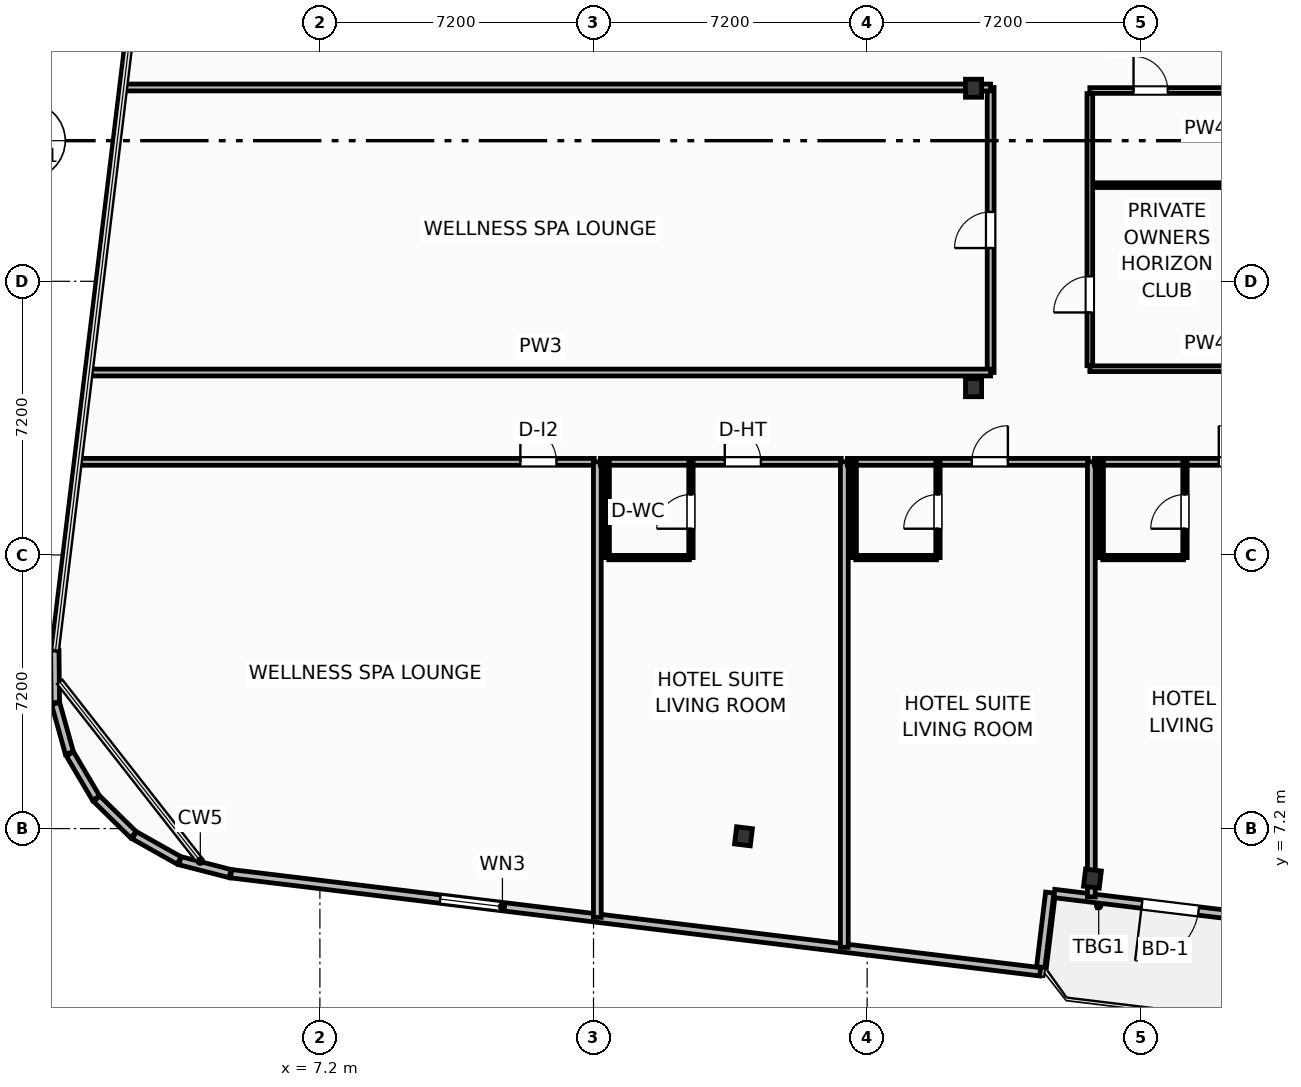
"""IFC4 building model, lengths in metres.
Left out: names, types, materials, properties, quantities, classifications, styles, units other than length and angle.
Written with IfcOpenShell. Run it as: python <this file> out.ifc"""

import sys

from ifc_helpers import new_model, si_unit, direction, frame, frame_2d, origin, origin_2d, place, context, subcontext, project, spatial, rectangle, i_section, extrude, element, fill, save


model = new_model("IFC4")
c1 = context("Model", 3, precision=1e-05, world=origin(), true_north=direction((0.0, 1.0)))
c2 = subcontext(c1, "Body", "Model", "MODEL_VIEW")
j1 = project(units=[si_unit("LENGTHUNIT", "METRE"), si_unit("PLANEANGLEUNIT", "RADIAN")], contexts=[c1])
p1 = place(None, origin())
s1 = spatial("IfcSite", under=j1, at=p1, CompositionType="ELEMENT")
p2 = place(p1, origin())
s2 = spatial("IfcBuilding", under=s1, at=p2, CompositionType="ELEMENT")
p3 = place(p2, frame((0.0, 0.0, 121.7)))
s3 = spatial("IfcBuildingStorey", under=s2, at=p3, CompositionType="ELEMENT", Elevation=121.7)
for number, where, z_axis, x_axis in (
    (1, (24.4, 18.8, 0.0), (0.0, 0.0, 1.0), (1.0, 0.0, 0.0)),
    (2, (24.4, 26.68, 0.0), (0.0, 0.0, 1.0), (1.0, 0.0, 0.0)),
):
    element("IfcColumn", number, at=place(p3, frame(where, z_axis=z_axis, x_axis=x_axis)), inside=s3, PredefinedType="COLUMN", context=c2, shape_type="SweptSolid", body=[
        extrude(i_section(OverallWidth=0.424, OverallDepth=0.474, WebThickness=0.048, FlangeThickness=0.077, FilletRadius=0.025, at=origin_2d()), origin(), (0.0, 0.0, 1.0), 3.7),
    ])
for number, where, z_axis, x_axis in (
    (3, (18.346, 6.997, 0.0), (0.0, 0.0, 1.0), (0.993, -0.12, 0.0)),
    (4, (27.529, 5.884, 0.0), (0.0, 0.0, 1.0), (0.993, -0.12, 0.0)),
):
    element("IfcColumn", number, at=place(p3, frame(where, z_axis=z_axis, x_axis=x_axis)), inside=s3, PredefinedType="COLUMN", context=c2, shape_type="SweptSolid", body=[
        extrude(i_section(OverallWidth=0.418, OverallDepth=0.455, WebThickness=0.042, FlangeThickness=0.068, FilletRadius=0.025, at=origin_2d()), origin(), (0.0, 0.0, 1.0), 3.7),
    ])
p4 = place(p3, frame((32.48, 4.77, 0.0), z_axis=(0.0, 0.0, 1.0), x_axis=(-0.992735402148, 0.120318000826, 0.0)))
e5 = element("IfcWall", 5, at=p4, inside=s3, PredefinedType="SOLIDWALL", context=c2, shape_type="SweptSolid", body=[
    extrude(rectangle(XDim=6.0, YDim=0.22, at=frame_2d((3.0, 0.0))), origin(), (0.0, 0.0, 1.0), 2.73),
])
p5 = place(p4, frame((2.176, 0.0, 0.0)))
e6 = element("IfcOpeningElement", 6, at=p5, cuts=e5, PredefinedType="OPENING", context=c2, shape_type="SweptSolid", body=[
    extrude(rectangle(XDim=1.5, YDim=2.25, at=frame_2d((0.75, 1.125))), frame((0.0, 0.12, 0.0), z_axis=(0.0, -1.0, 0.0), x_axis=(1.0, 0.0, 0.0)), (0.0, 0.0, 1.0), 0.24),
])
p6 = place(p3, frame((0.224, 11.893, 0.0), z_axis=(0.0, 0.0, 1.0), x_axis=(0.010098705419, -0.999949006774, 0.0)))
e7 = element("IfcWall", 7, at=p6, inside=s3, PredefinedType="SOLIDWALL", context=c2, shape_type="SweptSolid", body=[
    extrude(rectangle(XDim=1.378, YDim=0.22, at=frame_2d((0.689, 0.0))), origin(), (0.0, 0.0, 1.0), 2.73),
])
p7 = place(p3, frame((0.245, 10.491, 0.0), z_axis=(0.0, 0.0, 1.0), x_axis=(0.268853470153, -0.963181089716, 0.0)))
e8 = element("IfcWall", 8, at=p7, inside=s3, PredefinedType="SOLIDWALL", context=c2, shape_type="SweptSolid", body=[
    extrude(rectangle(XDim=1.353, YDim=0.22, at=frame_2d((0.677, 0.0))), origin(), (0.0, 0.0, 1.0), 2.73),
])
p8 = place(p3, frame((0.622, 9.166, 0.0), z_axis=(0.0, 0.0, 1.0), x_axis=(0.508911700393, -0.860818727261, 0.0)))
e9 = element("IfcWall", 9, at=p8, inside=s3, PredefinedType="SOLIDWALL", context=c2, shape_type="SweptSolid", body=[
    extrude(rectangle(XDim=1.353, YDim=0.22, at=frame_2d((0.676, 0.0))), origin(), (0.0, 0.0, 1.0), 2.73),
])
p9 = place(p3, frame((1.328, 7.984, 0.0), z_axis=(0.0, 0.0, 1.0), x_axis=(0.714376989847, -0.69976104234, 0.0)))
e10 = element("IfcWall", 10, at=p9, inside=s3, PredefinedType="SOLIDWALL", context=c2, shape_type="SweptSolid", body=[
    extrude(rectangle(XDim=1.353, YDim=0.22, at=frame_2d((0.677, 0.0))), origin(), (0.0, 0.0, 1.0), 2.73),
])
p10 = place(p3, frame((2.316, 7.025, 0.0), z_axis=(0.0, 0.0, 1.0), x_axis=(0.87113677592, -0.491040443996, 0.0)))
e11 = element("IfcWall", 11, at=p10, inside=s3, PredefinedType="SOLIDWALL", context=c2, shape_type="SweptSolid", body=[
    extrude(rectangle(XDim=1.353, YDim=0.22, at=frame_2d((0.677, 0.0))), origin(), (0.0, 0.0, 1.0), 2.73),
])
p11 = place(p3, frame((3.519, 6.354, 0.0), z_axis=(0.0, 0.0, 1.0), x_axis=(0.968506529347, -0.248988157573, 0.0)))
e12 = element("IfcWall", 12, at=p11, inside=s3, PredefinedType="SOLIDWALL", context=c2, shape_type="SweptSolid", body=[
    extrude(rectangle(XDim=1.361, YDim=0.22, at=frame_2d((0.681, 0.0))), origin(), (0.0, 0.0, 1.0), 2.73),
])
p12 = place(p3, frame((4.862, 6.012, 0.0), z_axis=(0.0, 0.0, 1.0), x_axis=(0.99273213367, -0.120344965739, 0.0)))
e13 = element("IfcWall", 13, at=p12, inside=s3, PredefinedType="SOLIDWALL", context=c2, shape_type="SweptSolid", body=[
    extrude(rectangle(XDim=21.447, YDim=0.22, at=frame_2d((10.724, 0.0))), origin(), (0.0, 0.0, 1.0), 2.73),
])
p13 = place(p12, frame((5.543, 0.0, 0.8)))
e14 = element("IfcOpeningElement", 14, at=p13, cuts=e13, PredefinedType="OPENING", context=c2, shape_type="SweptSolid", body=[
    extrude(rectangle(XDim=1.65, YDim=1.65, at=frame_2d((0.825, 0.825))), frame((0.0, 0.12, 0.0), z_axis=(0.0, -1.0, 0.0), x_axis=(1.0, 0.0, 0.0)), (0.0, 0.0, 1.0), 0.24),
])
p14 = place(p3, frame((26.168, 3.555, 0.0), z_axis=(0.0, 0.0, 1.0), x_axis=(0.120290754542, 0.992738703976, 0.0)))
e15 = element("IfcWall", 15, at=p14, inside=s3, PredefinedType="SOLIDWALL", context=c2, shape_type="SweptSolid", body=[
    extrude(rectangle(XDim=1.975, YDim=0.22, at=frame_2d((0.987, 0.0))), origin(), (0.0, 0.0, 1.0), 2.73),
])
p15 = place(p3, frame((0.884, 16.85, 0.0), z_axis=(0.0, 0.0, 1.0), x_axis=(1.0, 0.0, 0.0)))
e16 = element("IfcWall", 16, at=p15, inside=s3, PredefinedType="PARTITIONING", context=c2, shape_type="SweptSolid", body=[
    extrude(rectangle(XDim=13.536, YDim=0.18, at=frame_2d((6.768, 0.0))), origin(), (0.0, 0.0, 1.0), 3.45),
])
p16 = place(p15, frame((11.591, 0.0, 0.0)))
e17 = element("IfcOpeningElement", 17, at=p16, cuts=e16, PredefinedType="OPENING", context=c2, shape_type="SweptSolid", body=[
    extrude(rectangle(XDim=0.95, YDim=2.05, at=frame_2d((0.475, 1.025))), frame((0.0, 0.1, 0.0), z_axis=(0.0, -1.0, 0.0), x_axis=(1.0, 0.0, 0.0)), (0.0, 0.0, 1.0), 0.2),
])
p17 = place(p3, frame((14.5, 4.864, 0.0), z_axis=(0.0, 0.0, 1.0), x_axis=(0.0, 1.0, 0.0)))
e18 = element("IfcWall", 18, at=p17, inside=s3, PredefinedType="PARTITIONING", context=c2, shape_type="SweptSolid", body=[
    extrude(rectangle(XDim=11.986, YDim=0.205, at=frame_2d((5.993, 0.0))), origin(), (0.0, 0.0, 1.0), 3.45),
])
p18 = place(p3, frame((14.58, 16.85, 0.0), z_axis=(0.0, 0.0, 1.0), x_axis=(1.0, 0.0, 0.0)))
e19 = element("IfcWall", 19, at=p18, inside=s3, PredefinedType="PARTITIONING", context=c2, shape_type="SweptSolid", body=[
    extrude(rectangle(XDim=6.34, YDim=0.18, at=frame_2d((3.17, 0.0))), origin(), (0.0, 0.0, 1.0), 3.45),
])
p19 = place(p18, frame((3.274, 0.0, 0.0)))
e20 = element("IfcOpeningElement", 20, at=p19, cuts=e19, PredefinedType="OPENING", context=c2, shape_type="SweptSolid", body=[
    extrude(rectangle(XDim=0.95, YDim=2.15, at=frame_2d((0.475, 1.075))), frame((0.0, 0.1, 0.0), z_axis=(0.0, -1.0, 0.0), x_axis=(1.0, 0.0, 0.0)), (0.0, 0.0, 1.0), 0.2),
])
p20 = place(p3, frame((14.8, 14.33, 0.0), z_axis=(0.0, 0.0, 1.0), x_axis=(1.0, 0.0, 0.0)))
e21 = element("IfcWall", 21, at=p20, inside=s3, PredefinedType="PARTITIONING", context=c2, shape_type="SweptSolid", body=[
    extrude(rectangle(XDim=2.124, YDim=0.115, at=frame_2d((1.062, 0.0))), origin(), (0.0, 0.0, 1.0), 3.45),
])
p21 = place(p3, frame((16.964, 14.33, 0.0), z_axis=(0.0, 0.0, 1.0), x_axis=(0.0, 1.0, 0.0)))
e22 = element("IfcWall", 22, at=p21, inside=s3, PredefinedType="PARTITIONING", context=c2, shape_type="SweptSolid", body=[
    extrude(rectangle(XDim=2.52, YDim=0.115, at=frame_2d((1.26, 0.0))), origin(), (0.0, 0.0, 1.0), 3.45),
])
p22 = place(p21, frame((0.76, 0.0, 0.0)))
e23 = element("IfcOpeningElement", 23, at=p22, cuts=e22, PredefinedType="OPENING", context=c2, shape_type="SweptSolid", body=[
    extrude(rectangle(XDim=0.9, YDim=2.05, at=frame_2d((0.45, 1.025))), frame((0.0, 0.067, 0.0), z_axis=(0.0, -1.0, 0.0), x_axis=(1.0, 0.0, 0.0)), (0.0, 0.0, 1.0), 0.135),
])
p23 = place(p3, frame((14.76, 14.33, 0.0), z_axis=(0.0, 0.0, 1.0), x_axis=(0.0, 1.0, 0.0)))
e24 = element("IfcWall", 24, at=p23, inside=s3, PredefinedType="PARTITIONING", context=c2, shape_type="SweptSolid", body=[
    extrude(rectangle(XDim=2.52, YDim=0.115, at=frame_2d((1.26, 0.0))), origin(), (0.0, 0.0, 1.0), 3.45),
])
p24 = place(p3, frame((21.0, 4.076, 0.0), z_axis=(0.0, 0.0, 1.0), x_axis=(0.0, 1.0, 0.0)))
e25 = element("IfcWall", 25, at=p24, inside=s3, PredefinedType="PARTITIONING", context=c2, shape_type="SweptSolid", body=[
    extrude(rectangle(XDim=12.774, YDim=0.205, at=frame_2d((6.387, 0.0))), origin(), (0.0, 0.0, 1.0), 3.45),
])
p25 = place(p3, frame((21.08, 16.85, 0.0), z_axis=(0.0, 0.0, 1.0), x_axis=(1.0, 0.0, 0.0)))
e26 = element("IfcWall", 26, at=p25, inside=s3, PredefinedType="PARTITIONING", context=c2, shape_type="SweptSolid", body=[
    extrude(rectangle(XDim=6.34, YDim=0.18, at=frame_2d((3.17, 0.0))), origin(), (0.0, 0.0, 1.0), 3.45),
])
p26 = place(p25, frame((3.274, 0.0, 0.0)))
e27 = element("IfcOpeningElement", 27, at=p26, cuts=e26, PredefinedType="OPENING", context=c2, shape_type="SweptSolid", body=[
    extrude(rectangle(XDim=0.95, YDim=2.15, at=frame_2d((0.475, 1.075))), frame((0.0, 0.1, 0.0), z_axis=(0.0, -1.0, 0.0), x_axis=(1.0, 0.0, 0.0)), (0.0, 0.0, 1.0), 0.2),
])
p27 = place(p3, frame((21.3, 14.33, 0.0), z_axis=(0.0, 0.0, 1.0), x_axis=(1.0, 0.0, 0.0)))
e28 = element("IfcWall", 28, at=p27, inside=s3, PredefinedType="PARTITIONING", context=c2, shape_type="SweptSolid", body=[
    extrude(rectangle(XDim=2.124, YDim=0.115, at=frame_2d((1.062, 0.0))), origin(), (0.0, 0.0, 1.0), 3.45),
])
p28 = place(p3, frame((23.464, 14.33, 0.0), z_axis=(0.0, 0.0, 1.0), x_axis=(0.0, 1.0, 0.0)))
e29 = element("IfcWall", 29, at=p28, inside=s3, PredefinedType="PARTITIONING", context=c2, shape_type="SweptSolid", body=[
    extrude(rectangle(XDim=2.52, YDim=0.115, at=frame_2d((1.26, 0.0))), origin(), (0.0, 0.0, 1.0), 3.45),
])
p29 = place(p28, frame((0.76, 0.0, 0.0)))
e30 = element("IfcOpeningElement", 30, at=p29, cuts=e29, PredefinedType="OPENING", context=c2, shape_type="SweptSolid", body=[
    extrude(rectangle(XDim=0.9, YDim=2.05, at=frame_2d((0.45, 1.025))), frame((0.0, 0.067, 0.0), z_axis=(0.0, -1.0, 0.0), x_axis=(1.0, 0.0, 0.0)), (0.0, 0.0, 1.0), 0.135),
])
p30 = place(p3, frame((21.26, 14.33, 0.0), z_axis=(0.0, 0.0, 1.0), x_axis=(0.0, 1.0, 0.0)))
e31 = element("IfcWall", 31, at=p30, inside=s3, PredefinedType="PARTITIONING", context=c2, shape_type="SweptSolid", body=[
    extrude(rectangle(XDim=2.52, YDim=0.115, at=frame_2d((1.26, 0.0))), origin(), (0.0, 0.0, 1.0), 3.45),
])
p31 = place(p3, frame((27.5, 5.403, 0.0), z_axis=(0.0, 0.0, 1.0), x_axis=(0.0, 1.0, 0.0)))
e32 = element("IfcWall", 32, at=p31, inside=s3, PredefinedType="PARTITIONING", context=c2, shape_type="SweptSolid", body=[
    extrude(rectangle(XDim=11.447, YDim=0.205, at=frame_2d((5.723, 0.0))), origin(), (0.0, 0.0, 1.0), 2.662),
])
p32 = place(p3, frame((27.58, 16.85, 0.0), z_axis=(0.0, 0.0, 1.0), x_axis=(1.0, 0.0, 0.0)))
e33 = element("IfcWall", 33, at=p32, inside=s3, PredefinedType="PARTITIONING", context=c2, shape_type="SweptSolid", body=[
    extrude(rectangle(XDim=6.34, YDim=0.18, at=frame_2d((3.17, 0.0))), origin(), (0.0, 0.0, 1.0), 3.45),
])
p33 = place(p32, frame((3.274, 0.0, 0.0)))
e34 = element("IfcOpeningElement", 34, at=p33, cuts=e33, PredefinedType="OPENING", context=c2, shape_type="SweptSolid", body=[
    extrude(rectangle(XDim=0.95, YDim=2.15, at=frame_2d((0.475, 1.075))), frame((0.0, 0.1, 0.0), z_axis=(0.0, -1.0, 0.0), x_axis=(1.0, 0.0, 0.0)), (0.0, 0.0, 1.0), 0.2),
])
p34 = place(p3, frame((27.8, 14.33, 0.0), z_axis=(0.0, 0.0, 1.0), x_axis=(1.0, 0.0, 0.0)))
e35 = element("IfcWall", 35, at=p34, inside=s3, PredefinedType="PARTITIONING", context=c2, shape_type="SweptSolid", body=[
    extrude(rectangle(XDim=2.124, YDim=0.115, at=frame_2d((1.062, 0.0))), origin(), (0.0, 0.0, 1.0), 3.45),
])
p35 = place(p3, frame((29.964, 14.33, 0.0), z_axis=(0.0, 0.0, 1.0), x_axis=(0.0, 1.0, 0.0)))
e36 = element("IfcWall", 36, at=p35, inside=s3, PredefinedType="PARTITIONING", context=c2, shape_type="SweptSolid", body=[
    extrude(rectangle(XDim=2.52, YDim=0.115, at=frame_2d((1.26, 0.0))), origin(), (0.0, 0.0, 1.0), 3.45),
])
p36 = place(p35, frame((0.76, 0.0, 0.0)))
e37 = element("IfcOpeningElement", 37, at=p36, cuts=e36, PredefinedType="OPENING", context=c2, shape_type="SweptSolid", body=[
    extrude(rectangle(XDim=0.9, YDim=2.05, at=frame_2d((0.45, 1.025))), frame((0.0, 0.067, 0.0), z_axis=(0.0, -1.0, 0.0), x_axis=(1.0, 0.0, 0.0)), (0.0, 0.0, 1.0), 0.135),
])
p37 = place(p3, frame((27.76, 14.33, 0.0), z_axis=(0.0, 0.0, 1.0), x_axis=(0.0, 1.0, 0.0)))
e38 = element("IfcWall", 38, at=p37, inside=s3, PredefinedType="PARTITIONING", context=c2, shape_type="SweptSolid", body=[
    extrude(rectangle(XDim=2.52, YDim=0.115, at=frame_2d((1.26, 0.0))), origin(), (0.0, 0.0, 1.0), 3.45),
])
p38 = place(p3, frame((24.85, 19.2, 0.0), z_axis=(0.0, 0.0, 1.0), x_axis=(0.0, 1.0, 0.0)))
e39 = element("IfcWall", 39, at=p38, inside=s3, PredefinedType="PARTITIONING", context=c2, shape_type="SweptSolid", body=[
    extrude(rectangle(XDim=7.5, YDim=0.18, at=frame_2d((3.75, 0.0))), origin(), (0.0, 0.0, 1.0), 3.45),
])
p39 = place(p38, frame((3.275, 0.0, 0.0)))
e40 = element("IfcOpeningElement", 40, at=p39, cuts=e39, PredefinedType="OPENING", context=c2, shape_type="SweptSolid", body=[
    extrude(rectangle(XDim=0.95, YDim=2.05, at=frame_2d((0.475, 1.025))), frame((0.0, 0.1, 0.0), z_axis=(0.0, -1.0, 0.0), x_axis=(1.0, 0.0, 0.0)), (0.0, 0.0, 1.0), 0.2),
])
p40 = place(p3, frame((1.169, 19.2, 0.0), z_axis=(0.0, 0.0, 1.0), x_axis=(1.0, 0.0, 0.0)))
e41 = element("IfcWall", 41, at=p40, inside=s3, PredefinedType="PARTITIONING", context=c2, shape_type="SweptSolid", body=[
    extrude(rectangle(XDim=23.681, YDim=0.18, at=frame_2d((11.84, 0.0))), origin(), (0.0, 0.0, 1.0), 3.45),
])
p41 = place(p3, frame((2.078, 26.7, 0.0), z_axis=(0.0, 0.0, 1.0), x_axis=(1.0, 0.0, 0.0)))
e42 = element("IfcWall", 42, at=p41, inside=s3, PredefinedType="PARTITIONING", context=c2, shape_type="SweptSolid", body=[
    extrude(rectangle(XDim=22.772, YDim=0.18, at=frame_2d((11.386, 0.0))), origin(), (0.0, 0.0, 1.0), 2.662),
])
p42 = place(p3, frame((27.46, 19.3, 0.0), z_axis=(0.0, 0.0, 1.0), x_axis=(1.0, 0.0, 0.0)))
e43 = element("IfcWall", 43, at=p42, inside=s3, PredefinedType="PARTITIONING", context=c2, shape_type="SweptSolid", body=[
    extrude(rectangle(XDim=6.1, YDim=0.15, at=frame_2d((3.05, 0.0))), origin(), (0.0, 0.0, 1.0), 2.662),
])
p43 = place(p3, frame((27.46, 26.62, 0.0), z_axis=(0.0, 0.0, 1.0), x_axis=(1.0, 0.0, 0.0)))
e44 = element("IfcWall", 44, at=p43, inside=s3, PredefinedType="PARTITIONING", context=c2, shape_type="SweptSolid", body=[
    extrude(rectangle(XDim=6.1, YDim=0.15, at=frame_2d((3.05, 0.0))), origin(), (0.0, 0.0, 1.0), 2.662),
])
p44 = place(p43, frame((1.15, 0.0, 0.0)))
e45 = element("IfcOpeningElement", 45, at=p44, cuts=e44, PredefinedType="OPENING", context=c2, shape_type="SweptSolid", body=[
    extrude(rectangle(XDim=0.9, YDim=2.05, at=frame_2d((0.45, 1.025))), frame((0.0, 0.085, 0.0), z_axis=(0.0, -1.0, 0.0), x_axis=(1.0, 0.0, 0.0)), (0.0, 0.0, 1.0), 0.17),
])
p45 = place(p43, frame((4.45, 0.0, 0.0)))
e46 = element("IfcOpeningElement", 46, at=p45, cuts=e44, PredefinedType="OPENING", context=c2, shape_type="SweptSolid", body=[
    extrude(rectangle(XDim=0.92, YDim=2.05, at=frame_2d((0.46, 1.025))), frame((0.0, 0.085, 0.0), z_axis=(0.0, -1.0, 0.0), x_axis=(1.0, 0.0, 0.0)), (0.0, 0.0, 1.0), 0.17),
])
p46 = place(p3, frame((27.52, 24.13, 0.0), z_axis=(0.0, 0.0, 1.0), x_axis=(1.0, 0.0, 0.0)))
e47 = element("IfcWall", 47, at=p46, inside=s3, PredefinedType="PARTITIONING", context=c2, shape_type="SweptSolid", body=[
    extrude(rectangle(XDim=3.7, YDim=0.125, at=frame_2d((1.85, 0.0))), origin(), (0.0, 0.0, 1.0), 3.45),
])
p47 = place(p3, frame((27.46, 19.38, 0.0), z_axis=(0.0, 0.0, 1.0), x_axis=(0.0, 1.0, 0.0)))
e48 = element("IfcWall", 48, at=p47, inside=s3, PredefinedType="PARTITIONING", context=c2, shape_type="SweptSolid", body=[
    extrude(rectangle(XDim=7.16, YDim=0.15, at=frame_2d((3.58, 0.0))), origin(), (0.0, 0.0, 1.0), 3.45),
])
p48 = place(p47, frame((1.4, 0.0, 0.0)))
e49 = element("IfcOpeningElement", 49, at=p48, cuts=e48, PredefinedType="OPENING", context=c2, shape_type="SweptSolid", body=[
    extrude(rectangle(XDim=0.95, YDim=2.05, at=frame_2d((0.475, 1.025))), frame((0.0, 0.085, 0.0), z_axis=(0.0, -1.0, 0.0), x_axis=(1.0, 0.0, 0.0)), (0.0, 0.0, 1.0), 0.17),
])
p49 = place(p5, origin())
e50 = element("IfcDoor", 50, at=p49, inside=s3, OperationType="SINGLE_SWING_RIGHT", PredefinedType="DOOR", context=c2, shape_type="SweptSolid", body=[
    extrude(rectangle(XDim=1.5, YDim=2.25, at=frame_2d((0.75, 1.125))), frame((0.0, 0.025, 0.0), z_axis=(0.0, -1.0, 0.0), x_axis=(1.0, 0.0, 0.0)), (0.0, 0.0, 1.0), 0.05),
])
fill(e6, e50)
p50 = place(p13, origin())
e51 = element("IfcWindow", 51, at=p50, inside=s3, PartitioningType="SINGLE_PANEL", PredefinedType="WINDOW", context=c2, shape_type="SweptSolid", body=[
    extrude(rectangle(XDim=1.65, YDim=1.65, at=frame_2d((0.825, 0.825))), frame((0.0, 0.03, 0.0), z_axis=(0.0, -1.0, 0.0), x_axis=(1.0, 0.0, 0.0)), (0.0, 0.0, 1.0), 0.06),
])
fill(e14, e51)
p51 = place(p16, origin())
e52 = element("IfcDoor", 52, at=p51, inside=s3, OperationType="SINGLE_SWING_LEFT", PredefinedType="DOOR", context=c2, shape_type="SweptSolid", body=[
    extrude(rectangle(XDim=0.95, YDim=2.05, at=frame_2d((0.475, 1.025))), frame((0.0, 0.025, 0.0), z_axis=(0.0, -1.0, 0.0), x_axis=(1.0, 0.0, 0.0)), (0.0, 0.0, 1.0), 0.05),
])
fill(e17, e52)
p52 = place(p19, origin())
e53 = element("IfcDoor", 53, at=p52, inside=s3, OperationType="SINGLE_SWING_LEFT", PredefinedType="DOOR", context=c2, shape_type="SweptSolid", body=[
    extrude(rectangle(XDim=0.95, YDim=2.15, at=frame_2d((0.475, 1.075))), frame((0.0, 0.025, 0.0), z_axis=(0.0, -1.0, 0.0), x_axis=(1.0, 0.0, 0.0)), (0.0, 0.0, 1.0), 0.05),
])
fill(e20, e53)
p53 = place(p22, origin())
e54 = element("IfcDoor", 54, at=p53, inside=s3, OperationType="SINGLE_SWING_LEFT", PredefinedType="DOOR", context=c2, shape_type="SweptSolid", body=[
    extrude(rectangle(XDim=0.9, YDim=2.05, at=frame_2d((0.45, 1.025))), frame((0.0, 0.025, 0.0), z_axis=(0.0, -1.0, 0.0), x_axis=(1.0, 0.0, 0.0)), (0.0, 0.0, 1.0), 0.05),
])
fill(e23, e54)
p54 = place(p26, origin())
e55 = element("IfcDoor", 55, at=p54, inside=s3, OperationType="SINGLE_SWING_RIGHT", PredefinedType="DOOR", context=c2, shape_type="SweptSolid", body=[
    extrude(rectangle(XDim=0.95, YDim=2.15, at=frame_2d((0.475, 1.075))), frame((0.0, 0.025, 0.0), z_axis=(0.0, -1.0, 0.0), x_axis=(1.0, 0.0, 0.0)), (0.0, 0.0, 1.0), 0.05),
])
fill(e27, e55)
p55 = place(p29, origin())
e56 = element("IfcDoor", 56, at=p55, inside=s3, OperationType="SINGLE_SWING_LEFT", PredefinedType="DOOR", context=c2, shape_type="SweptSolid", body=[
    extrude(rectangle(XDim=0.9, YDim=2.05, at=frame_2d((0.45, 1.025))), frame((0.0, 0.025, 0.0), z_axis=(0.0, -1.0, 0.0), x_axis=(1.0, 0.0, 0.0)), (0.0, 0.0, 1.0), 0.05),
])
fill(e30, e56)
p56 = place(p33, origin())
e57 = element("IfcDoor", 57, at=p56, inside=s3, OperationType="SINGLE_SWING_LEFT", PredefinedType="DOOR", context=c2, shape_type="SweptSolid", body=[
    extrude(rectangle(XDim=0.95, YDim=2.15, at=frame_2d((0.475, 1.075))), frame((0.0, 0.025, 0.0), z_axis=(0.0, -1.0, 0.0), x_axis=(1.0, 0.0, 0.0)), (0.0, 0.0, 1.0), 0.05),
])
fill(e34, e57)
p57 = place(p36, origin())
e58 = element("IfcDoor", 58, at=p57, inside=s3, OperationType="SINGLE_SWING_LEFT", PredefinedType="DOOR", context=c2, shape_type="SweptSolid", body=[
    extrude(rectangle(XDim=0.9, YDim=2.05, at=frame_2d((0.45, 1.025))), frame((0.0, 0.025, 0.0), z_axis=(0.0, -1.0, 0.0), x_axis=(1.0, 0.0, 0.0)), (0.0, 0.0, 1.0), 0.05),
])
fill(e37, e58)
p58 = place(p39, origin())
e59 = element("IfcDoor", 59, at=p58, inside=s3, OperationType="SINGLE_SWING_LEFT", PredefinedType="DOOR", context=c2, shape_type="SweptSolid", body=[
    extrude(rectangle(XDim=0.95, YDim=2.05, at=frame_2d((0.475, 1.025))), frame((0.0, 0.025, 0.0), z_axis=(0.0, -1.0, 0.0), x_axis=(1.0, 0.0, 0.0)), (0.0, 0.0, 1.0), 0.05),
])
fill(e40, e59)
p59 = place(p44, origin())
e60 = element("IfcDoor", 60, at=p59, inside=s3, OperationType="SINGLE_SWING_LEFT", PredefinedType="DOOR", context=c2, shape_type="SweptSolid", body=[
    extrude(rectangle(XDim=0.9, YDim=2.05, at=frame_2d((0.45, 1.025))), frame((0.0, 0.025, 0.0), z_axis=(0.0, -1.0, 0.0), x_axis=(1.0, 0.0, 0.0)), (0.0, 0.0, 1.0), 0.05),
])
fill(e45, e60)
p60 = place(p48, origin())
e61 = element("IfcDoor", 61, at=p60, inside=s3, OperationType="SINGLE_SWING_LEFT", PredefinedType="DOOR", context=c2, shape_type="SweptSolid", body=[
    extrude(rectangle(XDim=0.95, YDim=2.05, at=frame_2d((0.475, 1.025))), frame((0.0, 0.025, 0.0), z_axis=(0.0, -1.0, 0.0), x_axis=(1.0, 0.0, 0.0)), (0.0, 0.0, 1.0), 0.05),
])
fill(e49, e61)
save(model, sys.argv[1])
